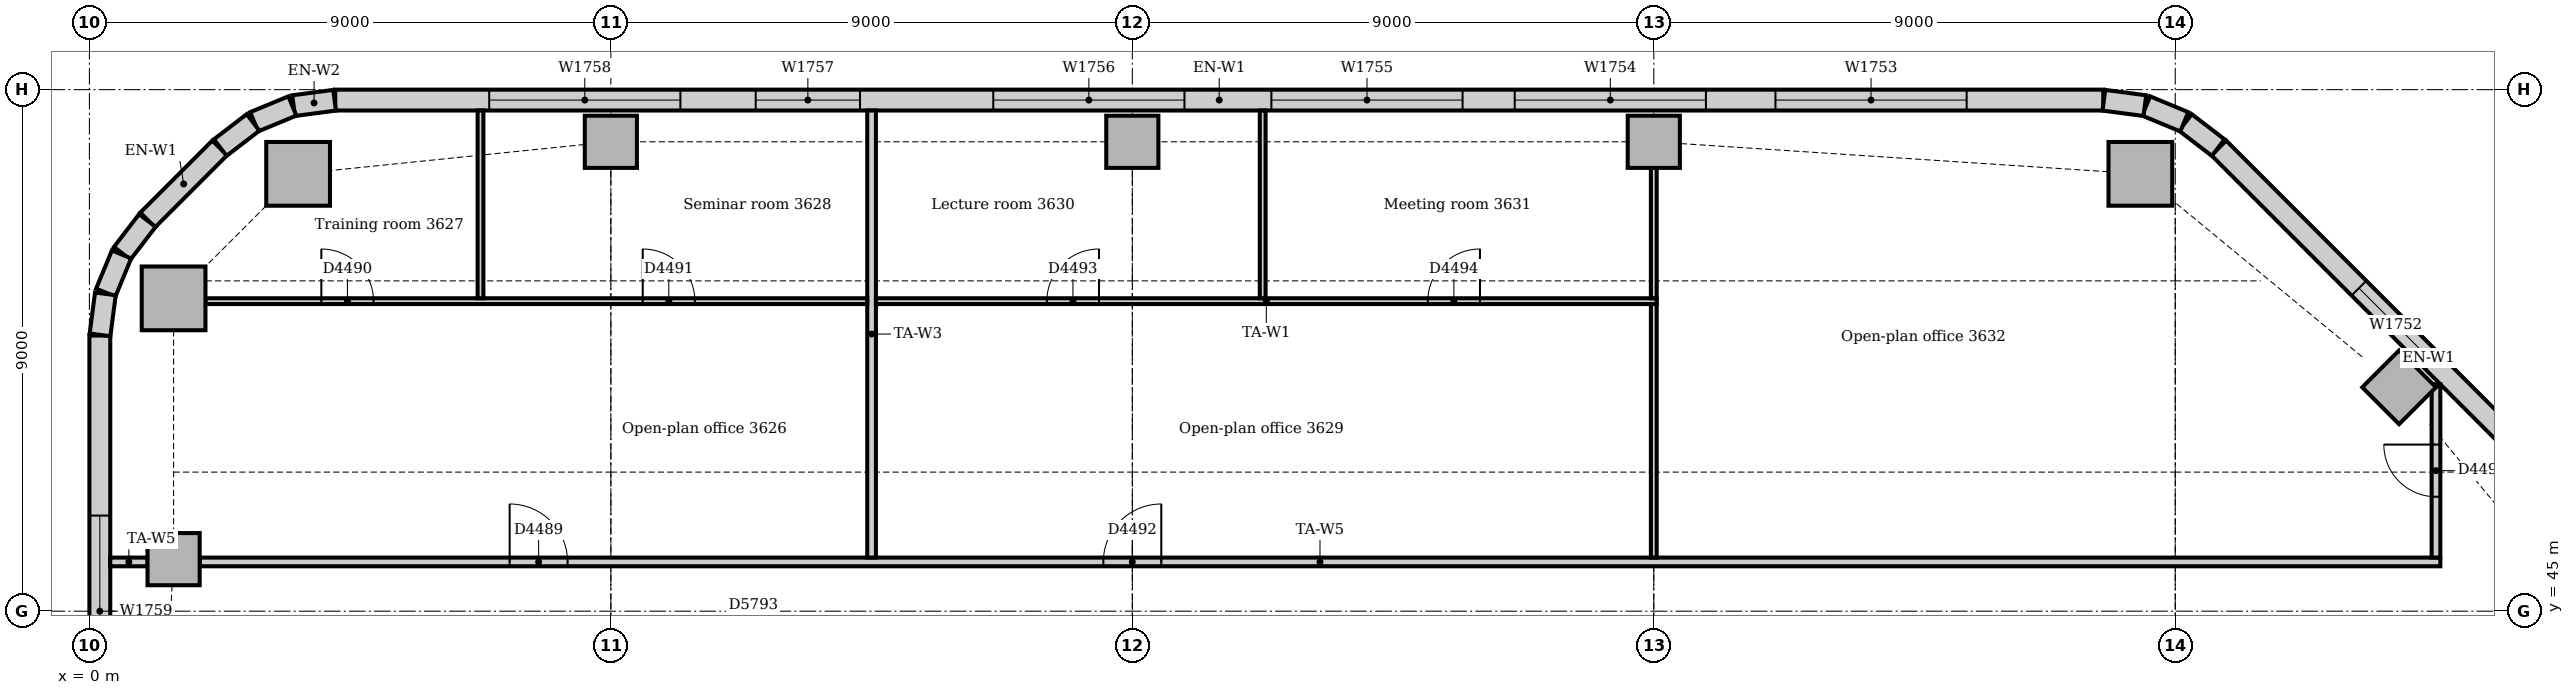
"""IFC4 building model, lengths in metres.
Left out: names, types, materials, properties, quantities, classifications, styles, units other than length and angle.
Written with IfcOpenShell. Run it as: python <this file> out.ifc"""

import sys

from ifc_helpers import new_model, si_unit, direction, frame, frame_2d, origin, origin_2d, place, context, subcontext, project, spatial, rectangle, extrude, element, fill, save


model = new_model("IFC4")
c1 = context("Model", 3, precision=1e-05, world=origin(), true_north=direction((0.0, 1.0)))
c2 = subcontext(c1, "Body", "Model", "MODEL_VIEW")
j1 = project(units=[si_unit("LENGTHUNIT", "METRE"), si_unit("PLANEANGLEUNIT", "RADIAN")], contexts=[c1])
p1 = place(None, origin())
s1 = spatial("IfcSite", under=j1, at=p1, CompositionType="ELEMENT")
p2 = place(p1, origin())
s2 = spatial("IfcBuilding", under=s1, at=p2, CompositionType="ELEMENT")
p3 = place(p2, frame((0.0, 0.0, 153.0)))
s3 = spatial("IfcBuildingStorey", under=s2, at=p3, CompositionType="ELEMENT", Elevation=153.0)
for number, where, z_axis, x_axis in (
    (1, (35.398, 52.547, 0.0), (0.0, 0.0, 1.0), (1.0, 0.0, 0.0)),
    (2, (3.602, 52.547, 0.0), (0.0, 0.0, 1.0), (1.0, 0.0, 0.0)),
    (3, (1.453, 50.398, 0.0), (0.0, 0.0, 1.0), (1.0, 0.0, 0.0)),
):
    element("IfcColumn", number, at=place(p3, frame(where, z_axis=z_axis, x_axis=x_axis)), inside=s3, PredefinedType="COLUMN", context=c2, shape_type="SweptSolid", body=[
        extrude(rectangle(XDim=1.1, YDim=1.1, at=origin_2d()), origin(), (0.0, 0.0, 1.0), 3.85),
    ])
for number, where, z_axis, x_axis in (
    (4, (39.864, 48.864, 0.0), (0.0, 0.0, 1.0), (0.707, 0.707, 0.0)),
    (5, (9.0, 53.1, 0.0), (0.0, 0.0, 1.0), (1.0, 0.0, 0.0)),
    (6, (18.0, 53.1, 0.0), (0.0, 0.0, 1.0), (1.0, 0.0, 0.0)),
    (7, (27.0, 53.1, 0.0), (0.0, 0.0, 1.0), (1.0, 0.0, 0.0)),
    (8, (1.453, 45.898, 0.0), (0.0, 0.0, 1.0), (1.0, 0.0, 0.0)),
):
    element("IfcColumn", number, at=place(p3, frame(where, z_axis=z_axis, x_axis=x_axis)), inside=s3, PredefinedType="COLUMN", context=c2, shape_type="SweptSolid", body=[
        extrude(rectangle(XDim=0.9, YDim=0.9, at=origin_2d()), origin(), (0.0, 0.0, 1.0), 3.85),
    ])
p4 = place(p3, frame((43.994, 45.751, 0.0), z_axis=(0.0, 0.0, 1.0), x_axis=(-0.707106781187, 0.707106781187, 0.0)))
e9 = element("IfcWall", 9, at=p4, inside=s3, PredefinedType="STANDARD", context=c2, shape_type="SweptSolid", body=[
    extrude(rectangle(XDim=10.243, YDim=0.36, at=frame_2d((5.121, 0.0))), origin(), (0.0, 0.0, 1.0), 3.85),
])
p5 = place(p4, frame((5.021, 0.0, 0.9)))
e10 = element("IfcOpeningElement", 10, at=p5, cuts=e9, PredefinedType="OPENING", context=c2, shape_type="SweptSolid", body=[
    extrude(rectangle(XDim=1.8, YDim=1.6, at=frame_2d((0.9, 0.8))), frame((0.0, 0.19, 0.0), z_axis=(0.0, -1.0, 0.0), x_axis=(1.0, 0.0, 0.0)), (0.0, 0.0, 1.0), 0.38),
])
p6 = place(p3, frame((34.757, 53.82, 0.0), z_axis=(0.0, 0.0, 1.0), x_axis=(-1.0, 0.0, 0.0)))
e11 = element("IfcWall", 11, at=p6, inside=s3, PredefinedType="STANDARD", context=c2, shape_type="SweptSolid", body=[
    extrude(rectangle(XDim=30.515, YDim=0.36, at=frame_2d((15.257, 0.0))), origin(), (0.0, 0.0, 1.0), 3.85),
])
p7 = place(p6, frame((2.357, 0.0, 0.9)))
e12 = element("IfcOpeningElement", 12, at=p7, cuts=e11, PredefinedType="OPENING", context=c2, shape_type="SweptSolid", body=[
    extrude(rectangle(XDim=3.3, YDim=1.6, at=frame_2d((1.65, 0.8))), frame((0.0, 0.19, 0.0), z_axis=(0.0, -1.0, 0.0), x_axis=(1.0, 0.0, 0.0)), (0.0, 0.0, 1.0), 0.38),
])
p8 = place(p6, frame((6.857, 0.0, 0.9)))
e13 = element("IfcOpeningElement", 13, at=p8, cuts=e11, PredefinedType="OPENING", context=c2, shape_type="SweptSolid", body=[
    extrude(rectangle(XDim=3.3, YDim=1.6, at=frame_2d((1.65, 0.8))), frame((0.0, 0.19, 0.0), z_axis=(0.0, -1.0, 0.0), x_axis=(1.0, 0.0, 0.0)), (0.0, 0.0, 1.0), 0.38),
])
p9 = place(p6, frame((11.057, 0.0, 0.9)))
e14 = element("IfcOpeningElement", 14, at=p9, cuts=e11, PredefinedType="OPENING", context=c2, shape_type="SweptSolid", body=[
    extrude(rectangle(XDim=3.3, YDim=1.6, at=frame_2d((1.65, 0.8))), frame((0.0, 0.19, 0.0), z_axis=(0.0, -1.0, 0.0), x_axis=(1.0, 0.0, 0.0)), (0.0, 0.0, 1.0), 0.38),
])
p10 = place(p6, frame((15.857, 0.0, 0.9)))
e15 = element("IfcOpeningElement", 15, at=p10, cuts=e11, PredefinedType="OPENING", context=c2, shape_type="SweptSolid", body=[
    extrude(rectangle(XDim=3.3, YDim=1.6, at=frame_2d((1.65, 0.8))), frame((0.0, 0.19, 0.0), z_axis=(0.0, -1.0, 0.0), x_axis=(1.0, 0.0, 0.0)), (0.0, 0.0, 1.0), 0.38),
])
p11 = place(p6, frame((21.457, 0.0, 0.9)))
e16 = element("IfcOpeningElement", 16, at=p11, cuts=e11, PredefinedType="OPENING", context=c2, shape_type="SweptSolid", body=[
    extrude(rectangle(XDim=1.8, YDim=1.6, at=frame_2d((0.9, 0.8))), frame((0.0, 0.19, 0.0), z_axis=(0.0, -1.0, 0.0), x_axis=(1.0, 0.0, 0.0)), (0.0, 0.0, 1.0), 0.38),
])
p12 = place(p6, frame((24.557, 0.0, 0.9)))
e17 = element("IfcOpeningElement", 17, at=p12, cuts=e11, PredefinedType="OPENING", context=c2, shape_type="SweptSolid", body=[
    extrude(rectangle(XDim=3.3, YDim=1.6, at=frame_2d((1.65, 0.8))), frame((0.0, 0.19, 0.0), z_axis=(0.0, -1.0, 0.0), x_axis=(1.0, 0.0, 0.0)), (0.0, 0.0, 1.0), 0.38),
])
p13 = place(p3, frame((2.249, 52.994, 0.0), z_axis=(0.0, 0.0, 1.0), x_axis=(-0.707106781187, -0.707106781187, 0.0)))
e18 = element("IfcWall", 18, at=p13, inside=s3, PredefinedType="STANDARD", context=c2, shape_type="SweptSolid", body=[
    extrude(rectangle(XDim=1.757, YDim=0.36, at=frame_2d((0.879, 0.0))), origin(), (0.0, 0.0, 1.0), 3.85),
])
p14 = place(p3, frame((0.18, 49.757, 0.0), z_axis=(0.0, 0.0, 1.0), x_axis=(0.0, -1.0, 0.0)))
e19 = element("IfcWall", 19, at=p14, inside=s3, PredefinedType="STANDARD", context=c2, shape_type="SweptSolid", body=[
    extrude(rectangle(XDim=7.757, YDim=0.36, at=frame_2d((3.879, 0.0))), origin(), (0.0, 0.0, 1.0), 3.85),
])
p15 = place(p14, frame((3.107, 0.0, 0.9)))
e20 = element("IfcOpeningElement", 20, at=p15, cuts=e19, PredefinedType="OPENING", context=c2, shape_type="SweptSolid", body=[
    extrude(rectangle(XDim=3.3, YDim=1.6, at=frame_2d((1.65, 0.8))), frame((0.0, 0.19, 0.0), z_axis=(0.0, -1.0, 0.0), x_axis=(1.0, 0.0, 0.0)), (0.0, 0.0, 1.0), 0.38),
])
p16 = place(p3, frame((36.741, 53.0, 0.0), z_axis=(0.0, 0.0, 1.0), x_axis=(-0.793321924995, 0.608802368033, 0.0)))
e21 = element("IfcWall", 21, at=p16, inside=s3, PredefinedType="STANDARD", context=c2, shape_type="SweptSolid", body=[
    extrude(rectangle(XDim=0.713, YDim=0.36, at=frame_2d((0.357, 0.0))), origin(), (0.0, 0.0, 1.0), 3.85),
])
for number, where, z_axis, x_axis in (
    (22, (36.156, 53.445, 0.0), (0.0, 0.0, 1.0), (-0.924, 0.383, 0.0)),
    (23, (35.476, 53.724, 0.0), (0.0, 0.0, 1.0), (-0.991, 0.131, 0.0)),
    (24, (4.231, 53.817, 0.0), (0.0, 0.0, 1.0), (-0.991, -0.131, 0.0)),
    (25, (3.503, 53.718, 0.0), (0.0, 0.0, 1.0), (-0.924, -0.383, 0.0)),
):
    element("IfcWall", number, at=place(p3, frame(where, z_axis=z_axis, x_axis=x_axis)), inside=s3, PredefinedType="STANDARD", context=c2, shape_type="SweptSolid", body=[
        extrude(rectangle(XDim=0.713, YDim=0.36, at=frame_2d((0.356, 0.0))), origin(), (0.0, 0.0, 1.0), 3.85),
    ])
for number, where, z_axis, x_axis in (
    (26, (2.825, 53.434, 0.0), (0.0, 0.0, 1.0), (-0.793, -0.609, 0.0)),
    (27, (1.0, 51.741, 0.0), (0.0, 0.0, 1.0), (-0.609, -0.793, 0.0)),
):
    element("IfcWall", number, at=place(p3, frame(where, z_axis=z_axis, x_axis=x_axis)), inside=s3, PredefinedType="STANDARD", context=c2, shape_type="SweptSolid", body=[
        extrude(rectangle(XDim=0.713, YDim=0.36, at=frame_2d((0.357, 0.0))), origin(), (0.0, 0.0, 1.0), 3.85),
    ])
for number, where, z_axis, x_axis in (
    (28, (0.555, 51.156, 0.0), (0.0, 0.0, 1.0), (-0.383, -0.924, 0.0)),
    (29, (0.276, 50.476, 0.0), (0.0, 0.0, 1.0), (-0.131, -0.991, 0.0)),
):
    element("IfcWall", number, at=place(p3, frame(where, z_axis=z_axis, x_axis=x_axis)), inside=s3, PredefinedType="STANDARD", context=c2, shape_type="SweptSolid", body=[
        extrude(rectangle(XDim=0.713, YDim=0.36, at=frame_2d((0.356, 0.0))), origin(), (0.0, 0.0, 1.0), 3.85),
    ])
p17 = place(p3, frame((1.903, 45.85, 0.0), z_axis=(0.0, 0.0, 1.0), x_axis=(1.0, 0.0, 0.0)))
e30 = element("IfcWall", 30, at=p17, inside=s3, PredefinedType="PARTITIONING", context=c2, shape_type="SweptSolid", body=[
    extrude(rectangle(XDim=38.672, YDim=0.15, at=frame_2d((19.336, 0.0))), origin(), (0.0, 0.0, 1.0), 3.85),
])
p18 = place(p17, frame((5.35, 0.0, 0.0)))
e31 = element("IfcOpeningElement", 31, at=p18, cuts=e30, PredefinedType="OPENING", context=c2, shape_type="SweptSolid", body=[
    extrude(rectangle(XDim=1.0, YDim=2.1, at=frame_2d((0.5, 1.05))), frame((0.0, 0.085, 0.0), z_axis=(0.0, -1.0, 0.0), x_axis=(1.0, 0.0, 0.0)), (0.0, 0.0, 1.0), 0.17),
])
p19 = place(p17, frame((15.597, 0.0, 0.0)))
e32 = element("IfcOpeningElement", 32, at=p19, cuts=e30, PredefinedType="OPENING", context=c2, shape_type="SweptSolid", body=[
    extrude(rectangle(XDim=1.0, YDim=2.1, at=frame_2d((0.5, 1.05))), frame((0.0, 0.085, 0.0), z_axis=(0.0, -1.0, 0.0), x_axis=(1.0, 0.0, 0.0)), (0.0, 0.0, 1.0), 0.17),
])
p20 = place(p3, frame((0.36, 45.85, 0.0), z_axis=(0.0, 0.0, 1.0), x_axis=(1.0, 0.0, 0.0)))
e33 = element("IfcWall", 33, at=p20, inside=s3, PredefinedType="PARTITIONING", context=c2, shape_type="SweptSolid", body=[
    extrude(rectangle(XDim=0.643, YDim=0.15, at=frame_2d((0.322, 0.0))), origin(), (0.0, 0.0, 1.0), 3.85),
])
p21 = place(p3, frame((40.5, 45.925, 0.0), z_axis=(0.0, 0.0, 1.0), x_axis=(0.0, 1.0, 0.0)))
e34 = element("IfcWall", 34, at=p21, inside=s3, PredefinedType="PARTITIONING", context=c2, shape_type="SweptSolid", body=[
    extrude(rectangle(XDim=2.991, YDim=0.15, at=frame_2d((1.496, 0.0))), origin(), (0.0, 0.0, 1.0), 3.85),
])
p22 = place(p21, frame((1.05, 0.0, 0.0)))
e35 = element("IfcOpeningElement", 35, at=p22, cuts=e34, PredefinedType="OPENING", context=c2, shape_type="SweptSolid", body=[
    extrude(rectangle(XDim=0.9, YDim=2.1, at=frame_2d((0.45, 1.05))), frame((0.0, 0.085, 0.0), z_axis=(0.0, -1.0, 0.0), x_axis=(1.0, 0.0, 0.0)), (0.0, 0.0, 1.0), 0.17),
])
p23 = place(p3, frame((13.5, 45.925, 0.0), z_axis=(0.0, 0.0, 1.0), x_axis=(0.0, 1.0, 0.0)))
e36 = element("IfcWall", 36, at=p23, inside=s3, PredefinedType="PARTITIONING", context=c2, shape_type="SweptSolid", body=[
    extrude(rectangle(XDim=7.715, YDim=0.15, at=frame_2d((3.857, 0.0))), origin(), (0.0, 0.0, 1.0), 3.85),
])
p24 = place(p3, frame((13.575, 50.35, 0.0), z_axis=(0.0, 0.0, 1.0), x_axis=(1.0, 0.0, 0.0)))
e37 = element("IfcWall", 37, at=p24, inside=s3, PredefinedType="PARTITIONING", context=c2, shape_type="SweptSolid", body=[
    extrude(rectangle(XDim=13.475, YDim=0.1, at=frame_2d((6.737, 0.0))), origin(), (0.0, 0.0, 1.0), 3.85),
])
p25 = place(p24, frame((2.95, 0.0, 0.0)))
e38 = element("IfcOpeningElement", 38, at=p25, cuts=e37, PredefinedType="OPENING", context=c2, shape_type="SweptSolid", body=[
    extrude(rectangle(XDim=0.9, YDim=2.1, at=frame_2d((0.45, 1.05))), frame((0.0, 0.06, 0.0), z_axis=(0.0, -1.0, 0.0), x_axis=(1.0, 0.0, 0.0)), (0.0, 0.0, 1.0), 0.12),
])
p26 = place(p24, frame((9.525, 0.0, 0.0)))
e39 = element("IfcOpeningElement", 39, at=p26, cuts=e37, PredefinedType="OPENING", context=c2, shape_type="SweptSolid", body=[
    extrude(rectangle(XDim=0.9, YDim=2.1, at=frame_2d((0.45, 1.05))), frame((0.0, 0.06, 0.0), z_axis=(0.0, -1.0, 0.0), x_axis=(1.0, 0.0, 0.0)), (0.0, 0.0, 1.0), 0.12),
])
p27 = place(p3, frame((2.003, 50.35, 0.0), z_axis=(0.0, 0.0, 1.0), x_axis=(1.0, 0.0, 0.0)))
e40 = element("IfcWall", 40, at=p27, inside=s3, PredefinedType="PARTITIONING", context=c2, shape_type="SweptSolid", body=[
    extrude(rectangle(XDim=11.422, YDim=0.1, at=frame_2d((5.711, 0.0))), origin(), (0.0, 0.0, 1.0), 3.85),
])
p28 = place(p27, frame((2.0, 0.0, 0.0)))
e41 = element("IfcOpeningElement", 41, at=p28, cuts=e40, PredefinedType="OPENING", context=c2, shape_type="SweptSolid", body=[
    extrude(rectangle(XDim=0.9, YDim=2.1, at=frame_2d((0.45, 1.05))), frame((0.0, 0.06, 0.0), z_axis=(0.0, -1.0, 0.0), x_axis=(1.0, 0.0, 0.0)), (0.0, 0.0, 1.0), 0.12),
])
p29 = place(p27, frame((7.547, 0.0, 0.0)))
e42 = element("IfcOpeningElement", 42, at=p29, cuts=e40, PredefinedType="OPENING", context=c2, shape_type="SweptSolid", body=[
    extrude(rectangle(XDim=0.9, YDim=2.1, at=frame_2d((0.45, 1.05))), frame((0.0, 0.06, 0.0), z_axis=(0.0, -1.0, 0.0), x_axis=(1.0, 0.0, 0.0)), (0.0, 0.0, 1.0), 0.12),
])
p30 = place(p3, frame((27.0, 45.925, 0.0), z_axis=(0.0, 0.0, 1.0), x_axis=(0.0, 1.0, 0.0)))
e43 = element("IfcWall", 43, at=p30, inside=s3, PredefinedType="PARTITIONING", context=c2, shape_type="SweptSolid", body=[
    extrude(rectangle(XDim=4.375, YDim=0.1, at=frame_2d((2.188, 0.0))), origin(), (0.0, 0.0, 1.0), 3.362),
])
p31 = place(p3, frame((27.0, 50.4, 0.0), z_axis=(0.0, 0.0, 1.0), x_axis=(0.0, 1.0, 0.0)))
e44 = element("IfcWall", 44, at=p31, inside=s3, PredefinedType="PARTITIONING", context=c2, shape_type="SweptSolid", body=[
    extrude(rectangle(XDim=2.25, YDim=0.1, at=frame_2d((1.125, 0.0))), origin(), (0.0, 0.0, 1.0), 3.362),
])
for number, where, z_axis, x_axis in (
    (45, (6.75, 50.4, 0.0), (0.0, 0.0, 1.0), (0.0, 1.0, 0.0)),
    (46, (20.25, 50.4, 0.0), (0.0, 0.0, 1.0), (0.0, 1.0, 0.0)),
):
    element("IfcWall", number, at=place(p3, frame(where, z_axis=z_axis, x_axis=x_axis)), inside=s3, PredefinedType="PARTITIONING", context=c2, shape_type="SweptSolid", body=[
        extrude(rectangle(XDim=3.24, YDim=0.1, at=frame_2d((1.62, 0.0))), origin(), (0.0, 0.0, 1.0), 3.85),
    ])
p32 = place(p5, origin())
e47 = element("IfcWindow", 47, at=p32, inside=s3, PartitioningType="SINGLE_PANEL", PredefinedType="WINDOW", context=c2, shape_type="SweptSolid", body=[
    extrude(rectangle(XDim=1.8, YDim=1.6, at=frame_2d((0.9, 0.8))), frame((0.0, 0.13, 0.0), z_axis=(0.0, -1.0, 0.0), x_axis=(1.0, 0.0, 0.0)), (0.0, 0.0, 1.0), 0.06),
])
fill(e10, e47)
p33 = place(p7, origin())
e48 = element("IfcWindow", 48, at=p33, inside=s3, PartitioningType="SINGLE_PANEL", PredefinedType="WINDOW", context=c2, shape_type="SweptSolid", body=[
    extrude(rectangle(XDim=3.3, YDim=1.6, at=frame_2d((1.65, 0.8))), frame((0.0, 0.13, 0.0), z_axis=(0.0, -1.0, 0.0), x_axis=(1.0, 0.0, 0.0)), (0.0, 0.0, 1.0), 0.06),
])
fill(e12, e48)
p34 = place(p8, origin())
e49 = element("IfcWindow", 49, at=p34, inside=s3, PartitioningType="SINGLE_PANEL", PredefinedType="WINDOW", context=c2, shape_type="SweptSolid", body=[
    extrude(rectangle(XDim=3.3, YDim=1.6, at=frame_2d((1.65, 0.8))), frame((0.0, 0.13, 0.0), z_axis=(0.0, -1.0, 0.0), x_axis=(1.0, 0.0, 0.0)), (0.0, 0.0, 1.0), 0.06),
])
fill(e13, e49)
p35 = place(p9, origin())
e50 = element("IfcWindow", 50, at=p35, inside=s3, PartitioningType="SINGLE_PANEL", PredefinedType="WINDOW", context=c2, shape_type="SweptSolid", body=[
    extrude(rectangle(XDim=3.3, YDim=1.6, at=frame_2d((1.65, 0.8))), frame((0.0, 0.13, 0.0), z_axis=(0.0, -1.0, 0.0), x_axis=(1.0, 0.0, 0.0)), (0.0, 0.0, 1.0), 0.06),
])
fill(e14, e50)
p36 = place(p10, origin())
e51 = element("IfcWindow", 51, at=p36, inside=s3, PartitioningType="SINGLE_PANEL", PredefinedType="WINDOW", context=c2, shape_type="SweptSolid", body=[
    extrude(rectangle(XDim=3.3, YDim=1.6, at=frame_2d((1.65, 0.8))), frame((0.0, 0.13, 0.0), z_axis=(0.0, -1.0, 0.0), x_axis=(1.0, 0.0, 0.0)), (0.0, 0.0, 1.0), 0.06),
])
fill(e15, e51)
p37 = place(p11, origin())
e52 = element("IfcWindow", 52, at=p37, inside=s3, PartitioningType="SINGLE_PANEL", PredefinedType="WINDOW", context=c2, shape_type="SweptSolid", body=[
    extrude(rectangle(XDim=1.8, YDim=1.6, at=frame_2d((0.9, 0.8))), frame((0.0, 0.13, 0.0), z_axis=(0.0, -1.0, 0.0), x_axis=(1.0, 0.0, 0.0)), (0.0, 0.0, 1.0), 0.06),
])
fill(e16, e52)
p38 = place(p12, origin())
e53 = element("IfcWindow", 53, at=p38, inside=s3, PartitioningType="SINGLE_PANEL", PredefinedType="WINDOW", context=c2, shape_type="SweptSolid", body=[
    extrude(rectangle(XDim=3.3, YDim=1.6, at=frame_2d((1.65, 0.8))), frame((0.0, 0.13, 0.0), z_axis=(0.0, -1.0, 0.0), x_axis=(1.0, 0.0, 0.0)), (0.0, 0.0, 1.0), 0.06),
])
fill(e17, e53)
p39 = place(p15, origin())
e54 = element("IfcWindow", 54, at=p39, inside=s3, PartitioningType="SINGLE_PANEL", PredefinedType="WINDOW", context=c2, shape_type="SweptSolid", body=[
    extrude(rectangle(XDim=3.3, YDim=1.6, at=frame_2d((1.65, 0.8))), frame((0.0, 0.13, 0.0), z_axis=(0.0, -1.0, 0.0), x_axis=(1.0, 0.0, 0.0)), (0.0, 0.0, 1.0), 0.06),
])
fill(e20, e54)
p40 = place(p18, origin())
e55 = element("IfcDoor", 55, at=p40, inside=s3, OperationType="SINGLE_SWING_LEFT", PredefinedType="DOOR", context=c2, shape_type="SweptSolid", body=[
    extrude(rectangle(XDim=1.0, YDim=2.1, at=frame_2d((0.5, 1.05))), frame((0.0, 0.025, 0.0), z_axis=(0.0, -1.0, 0.0), x_axis=(1.0, 0.0, 0.0)), (0.0, 0.0, 1.0), 0.05),
])
fill(e31, e55)
p41 = place(p28, origin())
e56 = element("IfcDoor", 56, at=p41, inside=s3, OperationType="SINGLE_SWING_LEFT", PredefinedType="DOOR", context=c2, shape_type="SweptSolid", body=[
    extrude(rectangle(XDim=0.9, YDim=2.1, at=frame_2d((0.45, 1.05))), frame((0.0, 0.025, 0.0), z_axis=(0.0, -1.0, 0.0), x_axis=(1.0, 0.0, 0.0)), (0.0, 0.0, 1.0), 0.05),
])
fill(e41, e56)
p42 = place(p29, origin())
e57 = element("IfcDoor", 57, at=p42, inside=s3, OperationType="SINGLE_SWING_LEFT", PredefinedType="DOOR", context=c2, shape_type="SweptSolid", body=[
    extrude(rectangle(XDim=0.9, YDim=2.1, at=frame_2d((0.45, 1.05))), frame((0.0, 0.025, 0.0), z_axis=(0.0, -1.0, 0.0), x_axis=(1.0, 0.0, 0.0)), (0.0, 0.0, 1.0), 0.05),
])
fill(e42, e57)
p43 = place(p19, origin())
e58 = element("IfcDoor", 58, at=p43, inside=s3, OperationType="SINGLE_SWING_RIGHT", PredefinedType="DOOR", context=c2, shape_type="SweptSolid", body=[
    extrude(rectangle(XDim=1.0, YDim=2.1, at=frame_2d((0.5, 1.05))), frame((0.0, 0.025, 0.0), z_axis=(0.0, -1.0, 0.0), x_axis=(1.0, 0.0, 0.0)), (0.0, 0.0, 1.0), 0.05),
])
fill(e32, e58)
p44 = place(p25, origin())
e59 = element("IfcDoor", 59, at=p44, inside=s3, OperationType="SINGLE_SWING_RIGHT", PredefinedType="DOOR", context=c2, shape_type="SweptSolid", body=[
    extrude(rectangle(XDim=0.9, YDim=2.1, at=frame_2d((0.45, 1.05))), frame((0.0, 0.025, 0.0), z_axis=(0.0, -1.0, 0.0), x_axis=(1.0, 0.0, 0.0)), (0.0, 0.0, 1.0), 0.05),
])
fill(e38, e59)
p45 = place(p26, origin())
e60 = element("IfcDoor", 60, at=p45, inside=s3, OperationType="SINGLE_SWING_RIGHT", PredefinedType="DOOR", context=c2, shape_type="SweptSolid", body=[
    extrude(rectangle(XDim=0.9, YDim=2.1, at=frame_2d((0.45, 1.05))), frame((0.0, 0.025, 0.0), z_axis=(0.0, -1.0, 0.0), x_axis=(1.0, 0.0, 0.0)), (0.0, 0.0, 1.0), 0.05),
])
fill(e39, e60)
p46 = place(p22, origin())
e61 = element("IfcDoor", 61, at=p46, inside=s3, OperationType="SINGLE_SWING_RIGHT", PredefinedType="DOOR", context=c2, shape_type="SweptSolid", body=[
    extrude(rectangle(XDim=0.9, YDim=2.1, at=frame_2d((0.45, 1.05))), frame((0.0, 0.025, 0.0), z_axis=(0.0, -1.0, 0.0), x_axis=(1.0, 0.0, 0.0)), (0.0, 0.0, 1.0), 0.05),
])
fill(e35, e61)
save(model, sys.argv[1])
